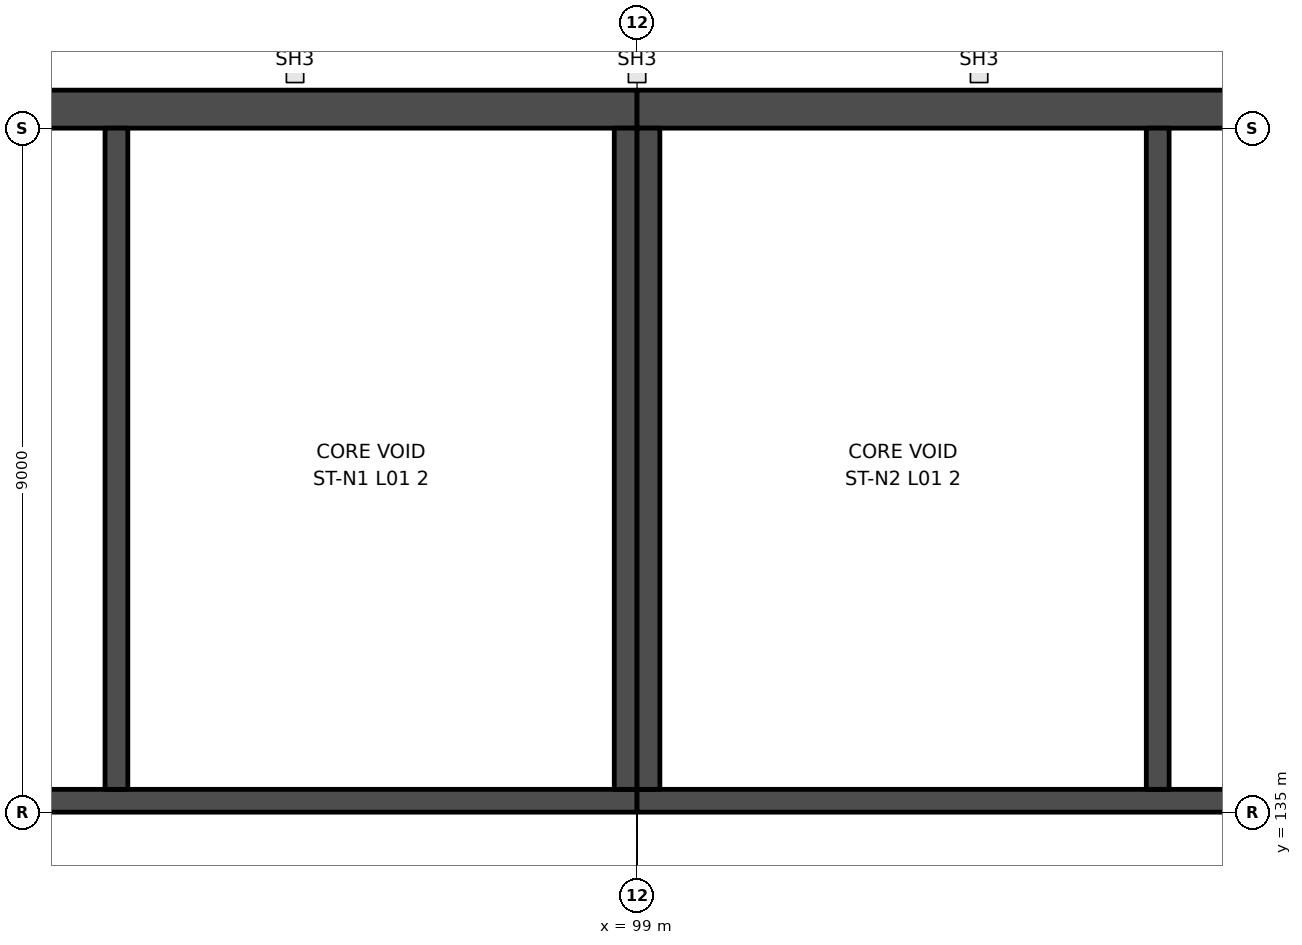
"""IFC4 building model, lengths in metres.
Left out: names, types, materials, properties, quantities, classifications, styles, units other than length and angle.
Written with IfcOpenShell. Run it as: python <this file> out.ifc"""

import sys

from ifc_helpers import new_model, si_unit, direction, frame, frame_2d, origin, place, context, subcontext, project, spatial, rectangle, extrude, element, save


model = new_model("IFC4")
c1 = context("Model", 3, precision=1e-05, world=origin(), true_north=direction((0.0, 1.0)))
c2 = subcontext(c1, "Body", "Model", "MODEL_VIEW")
j1 = project(units=[si_unit("LENGTHUNIT", "METRE"), si_unit("PLANEANGLEUNIT", "RADIAN")], contexts=[c1])
p1 = place(None, origin())
s1 = spatial("IfcSite", under=j1, at=p1, CompositionType="ELEMENT")
p2 = place(p1, origin())
s2 = spatial("IfcBuilding", under=s1, at=p2, CompositionType="ELEMENT")
p3 = place(p2, frame((0.0, 0.0, 7.0)))
s3 = spatial("IfcBuildingStorey", under=s2, at=p3, CompositionType="ELEMENT", Elevation=7.0)
p4 = place(p3, frame((81.0, 135.15, 0.0), z_axis=(0.0, 0.0, 1.0), x_axis=(1.0, 0.0, 0.0)))
e1 = element("IfcWall", 1, at=p4, inside=s3, PredefinedType="SHEAR", context=c2, shape_type="SweptSolid", body=[
    extrude(rectangle(XDim=18.0, YDim=0.3, at=frame_2d((9.0, 0.0))), origin(), (0.0, 0.0, 1.0), 4.5),
])
p5 = place(p4, frame((8.6, 0.0, 0.0)))
e2 = element("IfcOpeningElement", 2, at=p5, cuts=e1, PredefinedType="OPENING", context=c2, shape_type="SweptSolid", body=[
    extrude(rectangle(XDim=1.2, YDim=2.1, at=frame_2d((0.6, 1.05))), frame((0.0, 0.16, 0.0), z_axis=(0.0, -1.0, 0.0), x_axis=(1.0, 0.0, 0.0)), (0.0, 0.0, 1.0), 0.32),
])
p6 = place(p3, frame((81.0, 144.25, 0.0), z_axis=(0.0, 0.0, 1.0), x_axis=(1.0, 0.0, 0.0)))
e3 = element("IfcWall", 3, at=p6, inside=s3, PredefinedType="SHEAR", context=c2, shape_type="SweptSolid", body=[
    extrude(rectangle(XDim=18.0, YDim=0.5, at=frame_2d((9.0, 0.0))), origin(), (0.0, 0.0, 1.0), 4.5),
])
for number, where, z_axis, x_axis in (
    (4, (98.85, 135.3, 0.0), (0.0, 0.0, 1.0), (0.0, 1.0, 0.0)),
    (5, (92.15, 135.3, 0.0), (0.0, 0.0, 1.0), (0.0, 1.0, 0.0)),
):
    element("IfcWall", number, at=place(p3, frame(where, z_axis=z_axis, x_axis=x_axis)), inside=s3, PredefinedType="SHEAR", context=c2, shape_type="SweptSolid", body=[
        extrude(rectangle(XDim=8.7, YDim=0.3, at=frame_2d((4.35, 0.0))), origin(), (0.0, 0.0, 1.0), 4.5),
    ])
p7 = place(p3, frame((117.0, 135.15, 0.0), z_axis=(0.0, 0.0, 1.0), x_axis=(-1.0, 0.0, 0.0)))
e6 = element("IfcWall", 6, at=p7, inside=s3, PredefinedType="SHEAR", context=c2, shape_type="SweptSolid", body=[
    extrude(rectangle(XDim=18.0, YDim=0.3, at=frame_2d((9.0, 0.0))), origin(), (0.0, 0.0, 1.0), 4.5),
])
p8 = place(p7, frame((1.5, 0.0, 0.0)))
e7 = element("IfcOpeningElement", 7, at=p8, cuts=e6, PredefinedType="OPENING", context=c2, shape_type="SweptSolid", body=[
    extrude(rectangle(XDim=1.2, YDim=2.1, at=frame_2d((0.6, 1.05))), frame((0.0, 0.16, 0.0), z_axis=(0.0, -1.0, 0.0), x_axis=(1.0, 0.0, 0.0)), (0.0, 0.0, 1.0), 0.32),
])
p9 = place(p3, frame((117.0, 144.25, 0.0), z_axis=(0.0, 0.0, 1.0), x_axis=(-1.0, 0.0, 0.0)))
e8 = element("IfcWall", 8, at=p9, inside=s3, PredefinedType="SHEAR", context=c2, shape_type="SweptSolid", body=[
    extrude(rectangle(XDim=18.0, YDim=0.5, at=frame_2d((9.0, 0.0))), origin(), (0.0, 0.0, 1.0), 4.5),
])
for number, where, z_axis, x_axis in (
    (9, (99.15, 135.3, 0.0), (0.0, 0.0, 1.0), (0.0, 1.0, 0.0)),
    (10, (105.85, 135.3, 0.0), (0.0, 0.0, 1.0), (0.0, 1.0, 0.0)),
):
    element("IfcWall", number, at=place(p3, frame(where, z_axis=z_axis, x_axis=x_axis)), inside=s3, PredefinedType="SHEAR", context=c2, shape_type="SweptSolid", body=[
        extrude(rectangle(XDim=8.7, YDim=0.3, at=frame_2d((4.35, 0.0))), origin(), (0.0, 0.0, 1.0), 4.5),
    ])
save(model, sys.argv[1])
